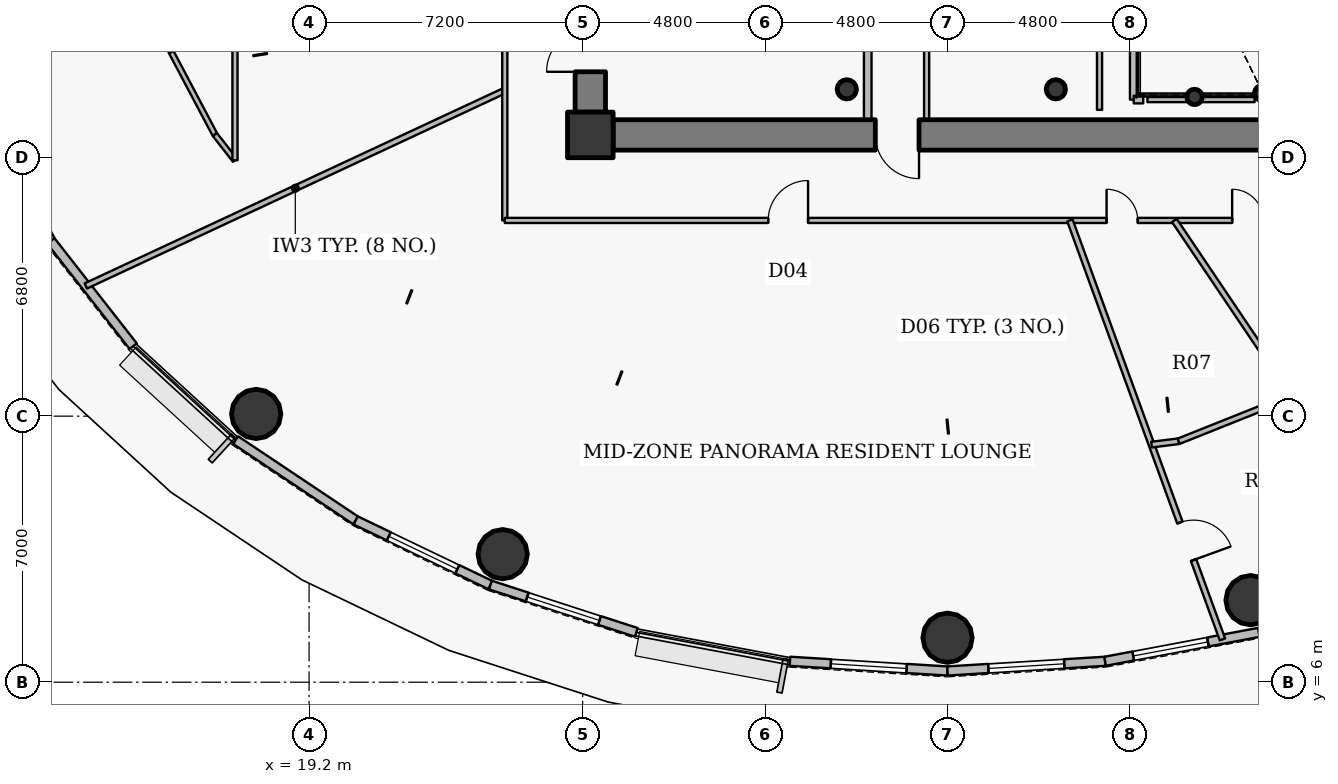
"""IFC4 building model, lengths in metres.
Left out: names, types, materials, properties, quantities, classifications, styles, units other than length and angle.
Written with IfcOpenShell. Run it as: python <this file> out.ifc"""

import sys

from ifc_helpers import new_model, si_unit, direction, frame, frame_2d, origin, origin_2d, place, context, subcontext, project, spatial, rectangle, hollow_circle, extrude, source, transform, mapped, element, fill, save


model = new_model("IFC4")
c1 = context("Model", 3, precision=1e-05, world=origin(), true_north=direction((0.0, 1.0)))
c2 = subcontext(c1, "Body", "Model", "MODEL_VIEW")
j1 = project(units=[si_unit("LENGTHUNIT", "METRE"), si_unit("PLANEANGLEUNIT", "RADIAN")], contexts=[c1])
p1 = place(None, origin())
s1 = spatial("IfcSite", under=j1, at=p1, CompositionType="ELEMENT")
p2 = place(p1, origin())
s2 = spatial("IfcBuilding", under=s1, at=p2, CompositionType="ELEMENT")
p3 = place(p2, frame((0.0, 0.0, 151.35)))
s3 = spatial("IfcBuildingStorey", under=s2, at=p3, CompositionType="ELEMENT", Elevation=151.35)
p4 = place(p3, frame((26.6, 20.4, 0.0), z_axis=(0.0, 0.0, 1.0), x_axis=(1.0, 0.0, 0.0)))
e1 = element("IfcColumn", 1, at=p4, inside=s3, PredefinedType="COLUMN", context=c2, shape_type="SweptSolid", body=[
    extrude(rectangle(XDim=1.2, YDim=1.2, at=origin_2d()), origin(), (0.0, 0.0, 1.0), 4.8),
])
for number, where, z_axis, x_axis in (
    (2, (33.35, 21.6, 0.0), (0.0, 0.0, 1.0), (1.0, 0.0, 0.0)),
    (3, (38.85, 21.6, 0.0), (0.0, 0.0, 1.0), (1.0, 0.0, 0.0)),
):
    element("IfcColumn", number, at=place(p3, frame(where, z_axis=z_axis, x_axis=x_axis)), inside=s3, PredefinedType="COLUMN", context=c2, shape_type="SweptSolid", body=[
        extrude(hollow_circle(Radius=0.254, WallThickness=0.02, at=origin_2d()), origin(), (0.0, 0.0, 1.0), 4.8),
    ])
for number, where, z_axis, x_axis in (
    (4, (44.28, 21.5, 0.0), (0.0, 0.0, 1.0), (1.0, 0.0, 0.0)),
    (5, (42.5, 21.4, 0.0), (0.0, 0.0, 1.0), (1.0, 0.0, 0.0)),
):
    element("IfcColumn", number, at=place(p3, frame(where, z_axis=z_axis, x_axis=x_axis)), inside=s3, PredefinedType="COLUMN", context=c2, shape_type="SweptSolid", body=[
        extrude(hollow_circle(Radius=0.203, WallThickness=0.016, at=origin_2d()), origin(), (0.0, 0.0, 1.0), 4.8),
    ])
p5 = place(p3, frame((44.8, 20.4, 0.0), z_axis=(0.0, 0.0, 1.0), x_axis=(-1.0, 0.0, 0.0)))
e6 = element("IfcWall", 6, at=p5, inside=s3, PredefinedType="SHEAR", context=c2, shape_type="SweptSolid", body=[
    extrude(rectangle(XDim=17.6, YDim=0.8, at=frame_2d((8.8, 0.0))), origin(), (0.0, 0.0, 1.0), 4.0),
])
p6 = place(p5, frame((9.55, 0.0, 0.0)))
e7 = element("IfcOpeningElement", 7, at=p6, cuts=e6, PredefinedType="OPENING", context=c2, shape_type="SweptSolid", body=[
    extrude(rectangle(XDim=1.15, YDim=2.15, at=origin_2d()), frame((0.575, 0.41, 1.075), z_axis=(0.0, -1.0, 0.0), x_axis=(1.0, 0.0, 0.0)), (0.0, 0.0, 1.0), 0.82),
])
p7 = place(p3, frame((26.6, 21.0, 0.0), z_axis=(0.0, 0.0, 1.0), x_axis=(0.0, 1.0, 0.0)))
e8 = element("IfcWall", 8, at=p7, inside=s3, PredefinedType="SHEAR", context=c2, shape_type="SweptSolid", body=[
    extrude(rectangle(XDim=12.0, YDim=0.8, at=frame_2d((6.0, 0.0))), origin(), (0.0, 0.0, 1.0), 4.0),
])
p8 = place(p7, frame((1.061, 0.0, 0.0)))
e9 = element("IfcOpeningElement", 9, at=p8, cuts=e8, PredefinedType="OPENING", context=c2, shape_type="SweptSolid", body=[
    extrude(rectangle(XDim=1.15, YDim=2.15, at=origin_2d()), frame((0.575, 0.41, 1.075), z_axis=(0.0, -1.0, 0.0), x_axis=(1.0, 0.0, 0.0)), (0.0, 0.0, 1.0), 0.82),
])
for number, where, z_axis, x_axis in (
    (10, (17.808, 13.058, -0.3), (0.0, 0.0, 1.0), (1.0, 0.0, 0.0)),
    (11, (24.294, 9.369, -0.3), (0.0, 0.0, 1.0), (1.0, 0.0, 0.0)),
    (12, (36.0, 7.17, -0.3), (0.0, 0.0, 1.0), (1.0, 0.0, 0.0)),
    (13, (43.973, 8.159, -0.3), (0.0, 0.0, 1.0), (1.0, 0.0, 0.0)),
):
    element("IfcColumn", number, at=place(p3, frame(where, z_axis=z_axis, x_axis=x_axis)), inside=s3, PredefinedType="COLUMN", context=c2, shape_type="SweptSolid", body=[
        extrude(hollow_circle(Radius=0.65, WallThickness=0.04, at=origin_2d()), origin(), (0.0, 0.0, 1.0), 5.1),
    ])
p9 = place(p3, frame((12.404, 17.612, 0.0), z_axis=(0.0, 0.0, 1.0), x_axis=(-0.467586874938, 0.88394712194, 0.0)))
e14 = element("IfcWall", 14, at=p9, inside=s3, PredefinedType="SOLIDWALL", context=c2, shape_type="SweptSolid", body=[
    extrude(rectangle(XDim=3.393, YDim=0.24, at=frame_2d((1.697, 0.0))), origin(), (0.0, 0.0, 1.0), 4.55),
])
p10 = place(p3, frame((14.572, 14.842, 0.0), z_axis=(0.0, 0.0, 1.0), x_axis=(-0.616287674549, 0.787521112224, 0.0)))
e15 = element("IfcWall", 15, at=p10, inside=s3, PredefinedType="SOLIDWALL", context=c2, shape_type="SweptSolid", body=[
    extrude(rectangle(XDim=3.517, YDim=0.24, at=frame_2d((1.759, 0.0))), origin(), (0.0, 0.0, 1.0), 4.55),
])
p11 = place(p3, frame((20.427, 10.257, 0.0), z_axis=(0.0, 0.0, 1.0), x_axis=(-0.831228998277, 0.555930168657, 0.0)))
e16 = element("IfcWall", 16, at=p11, inside=s3, PredefinedType="SOLIDWALL", context=c2, shape_type="SweptSolid", body=[
    extrude(rectangle(XDim=3.8, YDim=0.24, at=frame_2d((1.9, 0.0))), origin(), (0.0, 0.0, 1.0), 4.55),
])
p12 = place(p3, frame((23.97, 8.556, 0.0), z_axis=(0.0, 0.0, 1.0), x_axis=(-0.901564733809, 0.432644231155, 0.0)))
e17 = element("IfcWall", 17, at=p12, inside=s3, PredefinedType="SOLIDWALL", context=c2, shape_type="SweptSolid", body=[
    extrude(rectangle(XDim=3.93, YDim=0.24, at=frame_2d((1.965, 0.0))), origin(), (0.0, 0.0, 1.0), 4.55),
])
p13 = place(p12, frame((0.965, 0.0, 0.9)))
e18 = element("IfcOpeningElement", 18, at=p13, cuts=e17, PredefinedType="OPENING", context=c2, shape_type="SweptSolid", body=[
    extrude(rectangle(XDim=2.0, YDim=1.75, at=origin_2d()), frame((1.0, 0.13, 0.875), z_axis=(0.0, -1.0, 0.0), x_axis=(1.0, 0.0, 0.0)), (0.0, 0.0, 1.0), 0.26),
])
p14 = place(p3, frame((27.811, 7.311, 0.0), z_axis=(0.0, 0.0, 1.0), x_axis=(-0.951209870236, 0.30854462038, 0.0)))
e19 = element("IfcWall", 19, at=p14, inside=s3, PredefinedType="SOLIDWALL", context=c2, shape_type="SweptSolid", body=[
    extrude(rectangle(XDim=4.038, YDim=0.24, at=frame_2d((2.019, 0.0))), origin(), (0.0, 0.0, 1.0), 4.55),
])
p15 = place(p14, frame((1.019, 0.0, 0.9)))
e20 = element("IfcOpeningElement", 20, at=p15, cuts=e19, PredefinedType="OPENING", context=c2, shape_type="SweptSolid", body=[
    extrude(rectangle(XDim=2.0, YDim=1.75, at=origin_2d()), frame((1.0, 0.13, 0.875), z_axis=(0.0, -1.0, 0.0), x_axis=(1.0, 0.0, 0.0)), (0.0, 0.0, 1.0), 0.26),
])
p16 = place(p3, frame((36.0, 6.295, 0.0), z_axis=(0.0, 0.0, 1.0), x_axis=(-0.998104600619, 0.061540281305, 0.0)))
e21 = element("IfcWall", 21, at=p16, inside=s3, PredefinedType="SOLIDWALL", context=c2, shape_type="SweptSolid", body=[
    extrude(rectangle(XDim=4.154, YDim=0.24, at=frame_2d((2.077, 0.0))), origin(), (0.0, 0.0, 1.0), 4.55),
])
p17 = place(p16, frame((1.077, 0.0, 0.9)))
e22 = element("IfcOpeningElement", 22, at=p17, cuts=e21, PredefinedType="OPENING", context=c2, shape_type="SweptSolid", body=[
    extrude(rectangle(XDim=2.0, YDim=1.75, at=origin_2d()), frame((1.0, 0.13, 0.875), z_axis=(0.0, -1.0, 0.0), x_axis=(1.0, 0.0, 0.0)), (0.0, 0.0, 1.0), 0.26),
])
p18 = place(p3, frame((40.146, 6.551, 0.0), z_axis=(0.0, 0.0, 1.0), x_axis=(-0.998104600619, -0.061540281305, 0.0)))
e23 = element("IfcWall", 23, at=p18, inside=s3, PredefinedType="SOLIDWALL", context=c2, shape_type="SweptSolid", body=[
    extrude(rectangle(XDim=4.154, YDim=0.24, at=frame_2d((2.077, 0.0))), origin(), (0.0, 0.0, 1.0), 4.55),
])
p19 = place(p18, frame((1.077, 0.0, 0.9)))
e24 = element("IfcOpeningElement", 24, at=p19, cuts=e23, PredefinedType="OPENING", context=c2, shape_type="SweptSolid", body=[
    extrude(rectangle(XDim=2.0, YDim=1.75, at=origin_2d()), frame((1.0, 0.13, 0.875), z_axis=(0.0, -1.0, 0.0), x_axis=(1.0, 0.0, 0.0)), (0.0, 0.0, 1.0), 0.26),
])
p20 = place(p3, frame((44.189, 7.311, 0.0), z_axis=(0.0, 0.0, 1.0), x_axis=(-0.982788108205, -0.184736391573, 0.0)))
e25 = element("IfcWall", 25, at=p20, inside=s3, PredefinedType="SOLIDWALL", context=c2, shape_type="SweptSolid", body=[
    extrude(rectangle(XDim=4.114, YDim=0.24, at=frame_2d((2.057, 0.0))), origin(), (0.0, 0.0, 1.0), 4.55),
])
p21 = place(p20, frame((1.36, 0.0, 0.9)))
e26 = element("IfcOpeningElement", 26, at=p21, cuts=e25, PredefinedType="OPENING", context=c2, shape_type="SweptSolid", body=[
    extrude(rectangle(XDim=2.0, YDim=1.75, at=origin_2d()), frame((1.0, 0.13, 0.875), z_axis=(0.0, -1.0, 0.0), x_axis=(1.0, 0.0, 0.0)), (0.0, 0.0, 1.0), 0.26),
])
p22 = place(p3, frame((13.325, 16.427, 0.0), z_axis=(0.0, 0.0, 1.0), x_axis=(0.906307691216, 0.42261846723, 0.0)))
e27 = element("IfcWall", 27, at=p22, inside=s3, PredefinedType="PARTITIONING", context=c2, shape_type="SweptSolid", body=[
    extrude(rectangle(XDim=12.165, YDim=0.15, at=frame_2d((6.083, 0.0))), origin(), (0.0, 0.0, 1.0), 3.985),
])
p23 = place(p3, frame((15.4, 23.146, 0.0), z_axis=(0.0, 0.0, 1.0), x_axis=(0.293335154151, -0.956009669061, 0.0)))
e28 = element("IfcWall", 28, at=p23, inside=s3, PredefinedType="PARTITIONING", context=c2, shape_type="SweptSolid", body=[
    extrude(rectangle(XDim=0.594, YDim=0.135, at=frame_2d((0.297, 0.0))), origin(), (0.0, 0.0, 1.0), 4.55),
])
p24 = place(p3, frame((15.574, 22.578, 0.0), z_axis=(0.0, 0.0, 1.0), x_axis=(0.46757196543, -0.883955008552, 0.0)))
e29 = element("IfcWall", 29, at=p24, inside=s3, PredefinedType="PARTITIONING", context=c2, shape_type="SweptSolid", body=[
    extrude(rectangle(XDim=2.451, YDim=0.135, at=frame_2d((1.226, 0.0))), origin(), (0.0, 0.0, 1.0), 3.985),
])
p25 = place(p3, frame((16.72, 20.411, 0.0), z_axis=(0.0, 0.0, 1.0), x_axis=(0.616377221056, -0.787451027914, 0.0)))
e30 = element("IfcWall", 30, at=p25, inside=s3, PredefinedType="PARTITIONING", context=c2, shape_type="SweptSolid", body=[
    extrude(rectangle(XDim=0.859, YDim=0.135, at=frame_2d((0.43, 0.0))), origin(), (0.0, 0.0, 1.0), 4.55),
])
p26 = place(p3, frame((17.25, 19.734, 0.0), z_axis=(0.0, 0.0, 1.0), x_axis=(0.0, 1.0, 0.0)))
e31 = element("IfcWall", 31, at=p26, inside=s3, PredefinedType="PARTITIONING", context=c2, shape_type="SweptSolid", body=[
    extrude(rectangle(XDim=6.316, YDim=0.135, at=frame_2d((3.158, 0.0))), origin(), (0.0, 0.0, 1.0), 3.985),
])
p27 = place(p3, frame((24.35, 18.15, 0.0), z_axis=(0.0, 0.0, 1.0), x_axis=(0.0, 1.0, 0.0)))
e32 = element("IfcWall", 32, at=p27, inside=s3, PredefinedType="PARTITIONING", context=c2, shape_type="SweptSolid", body=[
    extrude(rectangle(XDim=7.9, YDim=0.135, at=frame_2d((3.95, 0.0))), origin(), (0.0, 0.0, 1.0), 3.985),
])
p28 = place(p3, frame((24.35, 18.15, 0.0), z_axis=(0.0, 0.0, 1.0), x_axis=(1.0, 0.0, 0.0)))
e33 = element("IfcWall", 33, at=p28, inside=s3, PredefinedType="PARTITIONING", context=c2, shape_type="SweptSolid", body=[
    extrude(rectangle(XDim=23.85, YDim=0.135, at=frame_2d((11.925, 0.0))), origin(), (0.0, 0.0, 1.0), 3.985),
])
p29 = place(p28, frame((6.931, 0.0, 0.0)))
e34 = element("IfcOpeningElement", 34, at=p29, cuts=e33, PredefinedType="OPENING", context=c2, shape_type="SweptSolid", body=[
    extrude(rectangle(XDim=1.05, YDim=2.15, at=origin_2d()), frame((0.525, 0.078, 1.075), z_axis=(0.0, -1.0, 0.0), x_axis=(1.0, 0.0, 0.0)), (0.0, 0.0, 1.0), 0.155),
])
p30 = place(p28, frame((15.835, 0.0, 0.0)))
e35 = element("IfcOpeningElement", 35, at=p30, cuts=e33, PredefinedType="OPENING", context=c2, shape_type="SweptSolid", body=[
    extrude(rectangle(XDim=0.82, YDim=2.1, at=origin_2d()), frame((0.41, 0.078, 1.05), z_axis=(0.0, -1.0, 0.0), x_axis=(1.0, 0.0, 0.0)), (0.0, 0.0, 1.0), 0.155),
])
p31 = place(p28, frame((19.139, 0.0, 0.0)))
e36 = element("IfcOpeningElement", 36, at=p31, cuts=e33, PredefinedType="OPENING", context=c2, shape_type="SweptSolid", body=[
    extrude(rectangle(XDim=0.82, YDim=2.1, at=origin_2d()), frame((0.41, 0.078, 1.05), z_axis=(0.0, -1.0, 0.0), x_axis=(1.0, 0.0, 0.0)), (0.0, 0.0, 1.0), 0.155),
])
p32 = place(p28, frame((22.802, 0.0, 0.0)))
e37 = element("IfcOpeningElement", 37, at=p32, cuts=e33, PredefinedType="OPENING", context=c2, shape_type="SweptSolid", body=[
    extrude(rectangle(XDim=0.82, YDim=2.1, at=origin_2d()), frame((0.41, 0.078, 1.05), z_axis=(0.0, -1.0, 0.0), x_axis=(1.0, 0.0, 0.0)), (0.0, 0.0, 1.0), 0.155),
])
p33 = place(p3, frame((33.9, 20.8, 0.0), z_axis=(0.0, 0.0, 1.0), x_axis=(0.0, 1.0, 0.0)))
e38 = element("IfcWall", 38, at=p33, inside=s3, PredefinedType="PARTITIONING", context=c2, shape_type="SweptSolid", body=[
    extrude(rectangle(XDim=11.3, YDim=0.2, at=frame_2d((5.65, 0.0))), origin(), (0.0, 0.0, 1.0), 4.135),
])
p34 = place(p33, frame((6.98, 0.0, 0.0)))
e39 = element("IfcOpeningElement", 39, at=p34, cuts=e38, PredefinedType="OPENING", context=c2, shape_type="SweptSolid", body=[
    extrude(rectangle(XDim=1.05, YDim=2.15, at=origin_2d()), frame((0.525, 0.11, 1.075), z_axis=(0.0, -1.0, 0.0), x_axis=(1.0, 0.0, 0.0)), (0.0, 0.0, 1.0), 0.22),
])
p35 = place(p33, frame((8.495, 0.0, 0.0)))
e40 = element("IfcOpeningElement", 40, at=p35, cuts=e38, PredefinedType="OPENING", context=c2, shape_type="SweptSolid", body=[
    extrude(rectangle(XDim=1.05, YDim=2.15, at=origin_2d()), frame((0.525, 0.11, 1.075), z_axis=(0.0, -1.0, 0.0), x_axis=(1.0, 0.0, 0.0)), (0.0, 0.0, 1.0), 0.22),
])
p36 = place(p33, frame((9.995, 0.0, 0.0)))
e41 = element("IfcOpeningElement", 41, at=p36, cuts=e38, PredefinedType="OPENING", context=c2, shape_type="SweptSolid", body=[
    extrude(rectangle(XDim=1.05, YDim=2.15, at=origin_2d()), frame((0.525, 0.11, 1.075), z_axis=(0.0, -1.0, 0.0), x_axis=(1.0, 0.0, 0.0)), (0.0, 0.0, 1.0), 0.22),
])
p37 = place(p3, frame((35.45, 20.8, 0.0), z_axis=(0.0, 0.0, 1.0), x_axis=(0.0, 1.0, 0.0)))
e42 = element("IfcWall", 42, at=p37, inside=s3, PredefinedType="PARTITIONING", context=c2, shape_type="SweptSolid", body=[
    extrude(rectangle(XDim=2.9, YDim=0.135, at=frame_2d((1.45, 0.0))), origin(), (0.0, 0.0, 1.0), 4.135),
])
p38 = place(p3, frame((39.221, 18.15, 0.0), z_axis=(0.0, 0.0, 1.0), x_axis=(0.342025436493, -0.939690694214, 0.0)))
e43 = element("IfcWall", 43, at=p38, inside=s3, PredefinedType="PARTITIONING", context=c2, shape_type="SweptSolid", body=[
    extrude(rectangle(XDim=11.731, YDim=0.15, at=frame_2d((5.866, 0.0))), origin(), (0.0, 0.0, 1.0), 3.985),
])
p39 = place(p38, frame((8.459, 0.0, 0.0)))
e44 = element("IfcOpeningElement", 44, at=p39, cuts=e43, PredefinedType="OPENING", context=c2, shape_type="SweptSolid", body=[
    extrude(rectangle(XDim=1.05, YDim=2.15, at=origin_2d()), frame((0.525, 0.085, 1.075), z_axis=(0.0, -1.0, 0.0), x_axis=(1.0, 0.0, 0.0)), (0.0, 0.0, 1.0), 0.17),
])
p40 = place(p3, frame((40.9, 21.33, 0.0), z_axis=(0.0, 0.0, 1.0), x_axis=(0.0, 1.0, 0.0)))
e45 = element("IfcWall", 45, at=p40, inside=s3, PredefinedType="PARTITIONING", context=c2, shape_type="SweptSolid", body=[
    extrude(rectangle(XDim=5.91, YDim=0.2, at=frame_2d((2.955, 0.0))), origin(), (0.0, 0.0, 1.0), 4.085),
])
p41 = place(p3, frame((40.9, 21.33, 0.0), z_axis=(0.0, 0.0, 1.0), x_axis=(1.0, 0.0, 0.0)))
e46 = element("IfcWall", 46, at=p41, inside=s3, PredefinedType="PARTITIONING", context=c2, shape_type="SweptSolid", body=[
    extrude(rectangle(XDim=0.25, YDim=0.2, at=frame_2d((0.125, 0.0))), origin(), (0.0, 0.0, 1.0), 4.085),
])
p42 = place(p3, frame((41.368, 12.251, 0.0), z_axis=(0.0, 0.0, 1.0), x_axis=(0.992361079, 0.123367292608, 0.0)))
e47 = element("IfcWall", 47, at=p42, inside=s3, PredefinedType="PARTITIONING", context=c2, shape_type="SweptSolid", body=[
    extrude(rectangle(XDim=0.72, YDim=0.15, at=frame_2d((0.36, 0.0))), origin(), (0.0, 0.0, 1.0), 3.985),
])
p43 = place(p3, frame((41.969, 18.15, 0.0), z_axis=(0.0, 0.0, 1.0), x_axis=(0.559195426667, -0.829035870632, 0.0)))
e48 = element("IfcWall", 48, at=p43, inside=s3, PredefinedType="PARTITIONING", context=c2, shape_type="SweptSolid", body=[
    extrude(rectangle(XDim=11.397, YDim=0.15, at=frame_2d((5.699, 0.0))), origin(), (0.0, 0.0, 1.0), 3.985),
])
p44 = place(p43, frame((7.936, 0.0, 0.0)))
e49 = element("IfcOpeningElement", 49, at=p44, cuts=e48, PredefinedType="OPENING", context=c2, shape_type="SweptSolid", body=[
    extrude(rectangle(XDim=1.05, YDim=2.15, at=origin_2d()), frame((0.525, 0.085, 1.075), z_axis=(0.0, -1.0, 0.0), x_axis=(1.0, 0.0, 0.0)), (0.0, 0.0, 1.0), 0.17),
])
p45 = place(p3, frame((42.083, 12.34, 0.0), z_axis=(0.0, 0.0, 1.0), x_axis=(0.928809762736, 0.370556911481, 0.0)))
e50 = element("IfcWall", 50, at=p45, inside=s3, PredefinedType="PARTITIONING", context=c2, shape_type="SweptSolid", body=[
    extrude(rectangle(XDim=5.908, YDim=0.15, at=frame_2d((2.954, 0.0))), origin(), (0.0, 0.0, 1.0), 3.985),
])
p46 = place(p3, frame((44.08, 21.33, 0.0), z_axis=(0.0, 0.0, 1.0), x_axis=(-1.0, 0.0, 0.0)))
e51 = element("IfcWall", 51, at=p46, inside=s3, PredefinedType="PARTITIONING", context=c2, shape_type="SweptSolid", body=[
    extrude(rectangle(XDim=2.82, YDim=0.135, at=frame_2d((1.41, 0.0))), origin(), (0.0, 0.0, 1.0), 4.085),
])
p47 = place(p3, frame((40.0, 23.7, 0.0), z_axis=(0.0, 0.0, 1.0), x_axis=(0.0, -1.0, 0.0)))
e52 = element("IfcWall", 52, at=p47, inside=s3, PredefinedType="PARTITIONING", context=c2, shape_type="SweptSolid", body=[
    extrude(rectangle(XDim=2.64, YDim=0.135, at=frame_2d((1.32, 0.0))), origin(), (0.0, 0.0, 1.0), 4.085),
])
p48 = place(p3, frame((26.2, 20.99, 0.0), z_axis=(0.0, 0.0, 1.0), x_axis=(0.0, -1.0, 0.0)))
e53 = element("IfcWall", 53, at=p48, inside=s3, PredefinedType="PARTITIONING", context=c2, shape_type="SweptSolid", body=[
    extrude(rectangle(XDim=0.99, YDim=0.135, at=frame_2d((0.495, 0.0))), origin(), (0.0, 0.0, 1.0), 4.55),
])
p49 = place(p3, frame((26.508, 20.0, 0.0), z_axis=(0.0, 0.0, 1.0), x_axis=(1.0, 0.0, 0.0)))
e54 = element("IfcWall", 54, at=p49, inside=s3, PredefinedType="PARTITIONING", context=c2, shape_type="SweptSolid", body=[
    extrude(rectangle(XDim=0.682, YDim=0.135, at=frame_2d((0.341, 0.0))), origin(), (0.0, 0.0, 1.0), 3.985),
])
m1 = source(origin(), c2, "Body", "SweptSolid", [
    extrude(rectangle(XDim=2.0, YDim=1.75, at=origin_2d()), frame((1.0, 0.03, 0.875), z_axis=(0.0, -1.0, 0.0), x_axis=(1.0, 0.0, 0.0)), (0.0, 0.0, 1.0), 0.06),
])
p50 = place(p13, origin())
e55 = element("IfcWindow", 55, at=p50, inside=s3, PartitioningType="DOUBLE_PANEL_VERTICAL", PredefinedType="WINDOW", context=c2, shape_type="MappedRepresentation", body=[
    mapped(m1, transform((0.0, 0.0, 0.0), x_axis=(1.0, 0.0, 0.0), y_axis=(0.0, 1.0, 0.0), z_axis=(0.0, 0.0, 1.0), scale=1.0)),
])
fill(e18, e55)
p51 = place(p15, origin())
e56 = element("IfcWindow", 56, at=p51, inside=s3, PartitioningType="DOUBLE_PANEL_VERTICAL", PredefinedType="WINDOW", context=c2, shape_type="MappedRepresentation", body=[
    mapped(m1, transform((0.0, 0.0, 0.0), x_axis=(1.0, 0.0, 0.0), y_axis=(0.0, 1.0, 0.0), z_axis=(0.0, 0.0, 1.0), scale=1.0)),
])
fill(e20, e56)
p52 = place(p17, origin())
e57 = element("IfcWindow", 57, at=p52, inside=s3, PartitioningType="DOUBLE_PANEL_VERTICAL", PredefinedType="WINDOW", context=c2, shape_type="MappedRepresentation", body=[
    mapped(m1, transform((0.0, 0.0, 0.0), x_axis=(1.0, 0.0, 0.0), y_axis=(0.0, 1.0, 0.0), z_axis=(0.0, 0.0, 1.0), scale=1.0)),
])
fill(e22, e57)
p53 = place(p19, origin())
e58 = element("IfcWindow", 58, at=p53, inside=s3, PartitioningType="DOUBLE_PANEL_VERTICAL", PredefinedType="WINDOW", context=c2, shape_type="MappedRepresentation", body=[
    mapped(m1, transform((0.0, 0.0, 0.0), x_axis=(1.0, 0.0, 0.0), y_axis=(0.0, 1.0, 0.0), z_axis=(0.0, 0.0, 1.0), scale=1.0)),
])
fill(e24, e58)
p54 = place(p21, origin())
e59 = element("IfcWindow", 59, at=p54, inside=s3, PartitioningType="DOUBLE_PANEL_VERTICAL", PredefinedType="WINDOW", context=c2, shape_type="MappedRepresentation", body=[
    mapped(m1, transform((0.0, 0.0, 0.0), x_axis=(1.0, 0.0, 0.0), y_axis=(0.0, 1.0, 0.0), z_axis=(0.0, 0.0, 1.0), scale=1.0)),
])
fill(e26, e59)
m2 = source(origin(), c2, "Body", "SweptSolid", [
    extrude(rectangle(XDim=1.15, YDim=2.15, at=origin_2d()), frame((0.575, 0.025, 1.075), z_axis=(0.0, -1.0, 0.0), x_axis=(1.0, 0.0, 0.0)), (0.0, 0.0, 1.0), 0.05),
])
p55 = place(p8, origin())
e60 = element("IfcDoor", 60, at=p55, inside=s3, OperationType="SINGLE_SWING_LEFT", PredefinedType="DOOR", context=c2, shape_type="MappedRepresentation", body=[
    mapped(m2, transform((0.0, 0.0, 0.0), x_axis=(1.0, 0.0, 0.0), y_axis=(0.0, 1.0, 0.0), z_axis=(0.0, 0.0, 1.0), scale=1.0)),
])
fill(e9, e60)
p56 = place(p6, origin())
e61 = element("IfcDoor", 61, at=p56, inside=s3, OperationType="SINGLE_SWING_LEFT", PredefinedType="DOOR", context=c2, shape_type="MappedRepresentation", body=[
    mapped(m2, transform((0.0, 0.0, 0.0), x_axis=(1.0, 0.0, 0.0), y_axis=(0.0, 1.0, 0.0), z_axis=(0.0, 0.0, 1.0), scale=1.0)),
])
fill(e7, e61)
m3 = source(origin(), c2, "Body", "SweptSolid", [
    extrude(rectangle(XDim=1.05, YDim=2.15, at=origin_2d()), frame((0.525, 0.025, 1.075), z_axis=(0.0, -1.0, 0.0), x_axis=(1.0, 0.0, 0.0)), (0.0, 0.0, 1.0), 0.05),
])
p57 = place(p29, origin())
e62 = element("IfcDoor", 62, at=p57, inside=s3, OperationType="SINGLE_SWING_RIGHT", PredefinedType="DOOR", context=c2, shape_type="MappedRepresentation", body=[
    mapped(m3, transform((0.0, 0.0, 0.0), x_axis=(1.0, 0.0, 0.0), y_axis=(0.0, 1.0, 0.0), z_axis=(0.0, 0.0, 1.0), scale=1.0)),
])
fill(e34, e62)
m4 = source(origin(), c2, "Body", "SweptSolid", [
    extrude(rectangle(XDim=0.82, YDim=2.1, at=origin_2d()), frame((0.41, 0.025, 1.05), z_axis=(0.0, -1.0, 0.0), x_axis=(1.0, 0.0, 0.0)), (0.0, 0.0, 1.0), 0.05),
])
p58 = place(p30, origin())
e63 = element("IfcDoor", 63, at=p58, inside=s3, OperationType="SINGLE_SWING_LEFT", PredefinedType="DOOR", context=c2, shape_type="MappedRepresentation", body=[
    mapped(m4, transform((0.0, 0.0, 0.0), x_axis=(1.0, 0.0, 0.0), y_axis=(0.0, 1.0, 0.0), z_axis=(0.0, 0.0, 1.0), scale=1.0)),
])
fill(e35, e63)
p59 = place(p39, origin())
e64 = element("IfcDoor", 64, at=p59, inside=s3, OperationType="SINGLE_SWING_RIGHT", PredefinedType="DOOR", context=c2, shape_type="MappedRepresentation", body=[
    mapped(m3, transform((0.0, 0.0, 0.0), x_axis=(1.0, 0.0, 0.0), y_axis=(0.0, 1.0, 0.0), z_axis=(0.0, 0.0, 1.0), scale=1.0)),
])
fill(e44, e64)
p60 = place(p31, origin())
e65 = element("IfcDoor", 65, at=p60, inside=s3, OperationType="SINGLE_SWING_LEFT", PredefinedType="DOOR", context=c2, shape_type="MappedRepresentation", body=[
    mapped(m4, transform((0.0, 0.0, 0.0), x_axis=(1.0, 0.0, 0.0), y_axis=(0.0, 1.0, 0.0), z_axis=(0.0, 0.0, 1.0), scale=1.0)),
])
fill(e36, e65)
save(model, sys.argv[1])
